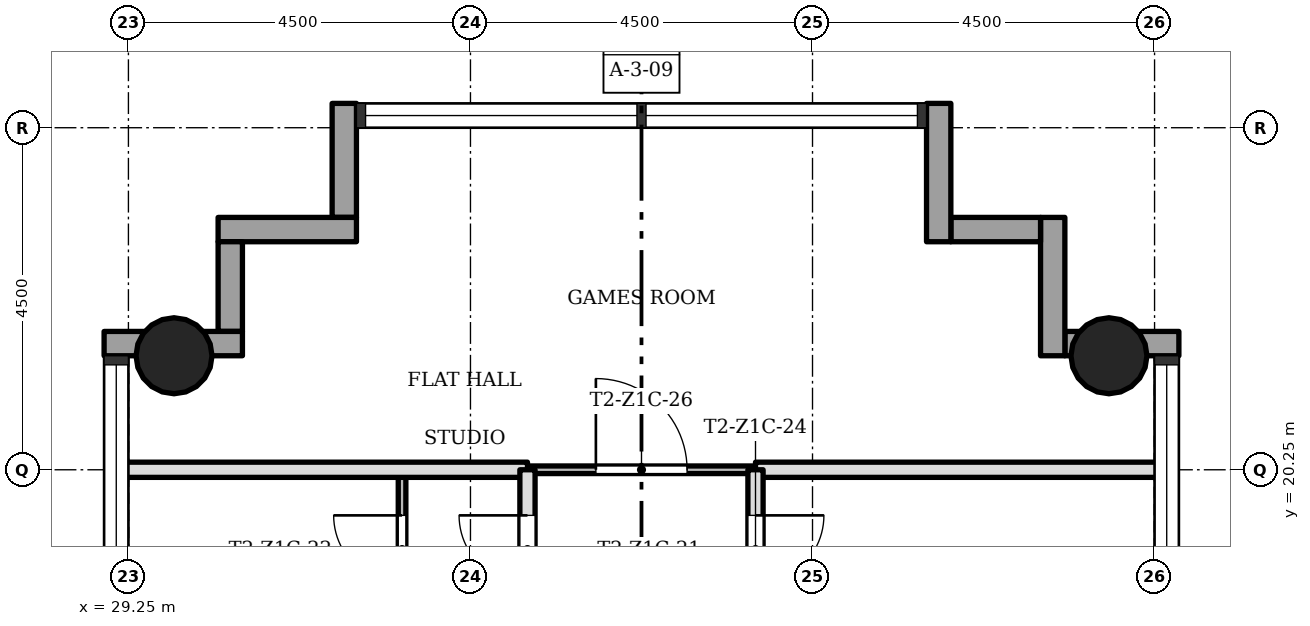
"""IFC4 building model, lengths in metres.
Left out: names, types, materials, properties, quantities, classifications, styles, units other than length and angle.
Written with IfcOpenShell. Run it as: python <this file> out.ifc"""

import sys

from ifc_helpers import new_model, si_unit, direction, frame, frame_2d, origin, origin_2d, place, context, subcontext, project, spatial, rectangle, hollow_circle, extrude, element, fill, save


model = new_model("IFC4")
c1 = context("Model", 3, precision=1e-05, world=origin(), true_north=direction((0.0, 1.0)))
c2 = subcontext(c1, "Body", "Model", "MODEL_VIEW")
j1 = project(units=[si_unit("LENGTHUNIT", "METRE"), si_unit("PLANEANGLEUNIT", "RADIAN")], contexts=[c1])
p1 = place(None, origin())
s1 = spatial("IfcSite", under=j1, at=p1, CompositionType="ELEMENT")
p2 = place(p1, origin())
s2 = spatial("IfcBuilding", under=s1, at=p2, CompositionType="ELEMENT")
p3 = place(p2, frame((0.0, 0.0, 48.3)))
s3 = spatial("IfcBuildingStorey", under=s2, at=p3, CompositionType="ELEMENT", Elevation=48.3)
for number, where, z_axis, x_axis in (
    (1, (42.15, 21.75, 0.0), (0.0, 0.0, 1.0), (1.0, 0.0, 0.0)),
    (2, (29.85, 21.75, 0.0), (0.0, 0.0, 1.0), (1.0, 0.0, 0.0)),
):
    element("IfcColumn", number, at=place(p3, frame(where, z_axis=z_axis, x_axis=x_axis)), inside=s3, PredefinedType="COLUMN", context=c2, shape_type="SweptSolid", body=[
        extrude(hollow_circle(Radius=0.5, WallThickness=0.036, at=origin_2d()), origin(), (0.0, 0.0, 1.0), 3.4),
    ])
p4 = place(p3, frame((43.07, 21.91, -0.3), z_axis=(0.0, 0.0, 1.0), x_axis=(-1.0, 0.0, 0.0)))
e3 = element("IfcWall", 3, at=p4, inside=s3, PredefinedType="STANDARD", context=c2, shape_type="SweptSolid", body=[
    extrude(rectangle(XDim=1.5, YDim=0.32, at=frame_2d((0.75, 0.0))), origin(), (0.0, 0.0, 1.0), 3.4),
])
p5 = place(p3, frame((41.41, 21.75, -0.3), z_axis=(0.0, 0.0, 1.0), x_axis=(0.0, 1.0, 0.0)))
e4 = element("IfcWall", 4, at=p5, inside=s3, PredefinedType="STANDARD", context=c2, shape_type="SweptSolid", body=[
    extrude(rectangle(XDim=1.82, YDim=0.32, at=frame_2d((0.91, 0.0))), origin(), (0.0, 0.0, 1.0), 3.4),
])
p6 = place(p3, frame((41.25, 23.41, -0.3), z_axis=(0.0, 0.0, 1.0), x_axis=(-1.0, 0.0, 0.0)))
e5 = element("IfcWall", 5, at=p6, inside=s3, PredefinedType="STANDARD", context=c2, shape_type="SweptSolid", body=[
    extrude(rectangle(XDim=1.18, YDim=0.32, at=frame_2d((0.59, 0.0))), origin(), (0.0, 0.0, 1.0), 3.4),
])
p7 = place(p3, frame((39.91, 23.25, -0.3), z_axis=(0.0, 0.0, 1.0), x_axis=(0.0, 1.0, 0.0)))
e6 = element("IfcWall", 6, at=p7, inside=s3, PredefinedType="STANDARD", context=c2, shape_type="SweptSolid", body=[
    extrude(rectangle(XDim=1.82, YDim=0.32, at=frame_2d((0.91, 0.0))), origin(), (0.0, 0.0, 1.0), 3.4),
])
p8 = place(p3, frame((32.09, 25.07, -0.3), z_axis=(0.0, 0.0, 1.0), x_axis=(0.0, -1.0, 0.0)))
e7 = element("IfcWall", 7, at=p8, inside=s3, PredefinedType="STANDARD", context=c2, shape_type="SweptSolid", body=[
    extrude(rectangle(XDim=1.5, YDim=0.32, at=frame_2d((0.75, 0.0))), origin(), (0.0, 0.0, 1.0), 3.4),
])
p9 = place(p3, frame((32.25, 23.41, -0.3), z_axis=(0.0, 0.0, 1.0), x_axis=(-1.0, 0.0, 0.0)))
e8 = element("IfcWall", 8, at=p9, inside=s3, PredefinedType="STANDARD", context=c2, shape_type="SweptSolid", body=[
    extrude(rectangle(XDim=1.82, YDim=0.32, at=frame_2d((0.91, 0.0))), origin(), (0.0, 0.0, 1.0), 3.4),
])
p10 = place(p3, frame((30.59, 23.25, -0.3), z_axis=(0.0, 0.0, 1.0), x_axis=(0.0, -1.0, 0.0)))
e9 = element("IfcWall", 9, at=p10, inside=s3, PredefinedType="STANDARD", context=c2, shape_type="SweptSolid", body=[
    extrude(rectangle(XDim=1.18, YDim=0.32, at=frame_2d((0.59, 0.0))), origin(), (0.0, 0.0, 1.0), 3.4),
])
p11 = place(p3, frame((30.75, 21.91, -0.3), z_axis=(0.0, 0.0, 1.0), x_axis=(-1.0, 0.0, 0.0)))
e10 = element("IfcWall", 10, at=p11, inside=s3, PredefinedType="STANDARD", context=c2, shape_type="SweptSolid", body=[
    extrude(rectangle(XDim=1.82, YDim=0.32, at=frame_2d((0.91, 0.0))), origin(), (0.0, 0.0, 1.0), 3.4),
])
p12 = place(p3, frame((37.5, 20.25, 0.0), z_axis=(0.0, 0.0, 1.0), x_axis=(-1.0, 0.0, 0.0)))
e11 = element("IfcWall", 11, at=p12, inside=s3, PredefinedType="PARTITIONING", context=c2, shape_type="SweptSolid", body=[
    extrude(rectangle(XDim=3.0, YDim=0.1, at=frame_2d((1.5, 0.0))), origin(), (0.0, 0.0, 1.0), 3.0),
])
p13 = place(p12, frame((0.9, 0.0, 0.0)))
e12 = element("IfcOpeningElement", 12, at=p13, cuts=e11, PredefinedType="OPENING", context=c2, shape_type="SweptSolid", body=[
    extrude(rectangle(XDim=1.2, YDim=2.1, at=frame_2d((0.6, 1.05))), frame((0.0, 0.06, 0.0), z_axis=(0.0, -1.0, 0.0), x_axis=(1.0, 0.0, 0.0)), (0.0, 0.0, 1.0), 0.12),
])
for number, where, z_axis, x_axis in (
    (13, (42.85, 20.25, 0.0), (0.0, 0.0, 1.0), (-1.0, 0.0, 0.0)),
    (14, (34.5, 20.25, 0.0), (0.0, 0.0, 1.0), (-1.0, 0.0, 0.0)),
):
    element("IfcWall", number, at=place(p3, frame(where, z_axis=z_axis, x_axis=x_axis)), inside=s3, PredefinedType="SOLIDWALL", context=c2, shape_type="SweptSolid", body=[
        extrude(rectangle(XDim=5.35, YDim=0.2, at=frame_2d((2.675, 0.0))), origin(), (0.0, 0.0, 1.0), 3.0),
    ])
p14 = place(p3, frame((37.5, 15.75, 0.0), z_axis=(0.0, 0.0, 1.0), x_axis=(0.0, 1.0, 0.0)))
e15 = element("IfcWall", 15, at=p14, inside=s3, PredefinedType="SOLIDWALL", context=c2, shape_type="SweptSolid", body=[
    extrude(rectangle(XDim=4.5, YDim=0.2, at=frame_2d((2.25, 0.0))), origin(), (0.0, 0.0, 1.0), 3.0),
])
p15 = place(p14, frame((3.0, 0.0, 0.0)))
e16 = element("IfcOpeningElement", 16, at=p15, cuts=e15, PredefinedType="OPENING", context=c2, shape_type="SweptSolid", body=[
    extrude(rectangle(XDim=0.9, YDim=2.1, at=frame_2d((0.45, 1.05))), frame((0.0, 0.11, 0.0), z_axis=(0.0, -1.0, 0.0), x_axis=(1.0, 0.0, 0.0)), (0.0, 0.0, 1.0), 0.22),
])
p16 = place(p3, frame((34.5, 15.75, 0.0), z_axis=(0.0, 0.0, 1.0), x_axis=(0.0, 1.0, 0.0)))
e17 = element("IfcWall", 17, at=p16, inside=s3, PredefinedType="SOLIDWALL", context=c2, shape_type="SweptSolid", body=[
    extrude(rectangle(XDim=4.5, YDim=0.2, at=frame_2d((2.25, 0.0))), origin(), (0.0, 0.0, 1.0), 3.0),
])
p17 = place(p16, frame((3.0, 0.0, 0.0)))
e18 = element("IfcOpeningElement", 18, at=p17, cuts=e17, PredefinedType="OPENING", context=c2, shape_type="SweptSolid", body=[
    extrude(rectangle(XDim=0.9, YDim=2.1, at=frame_2d((0.45, 1.05))), frame((0.0, 0.11, 0.0), z_axis=(0.0, -1.0, 0.0), x_axis=(1.0, 0.0, 0.0)), (0.0, 0.0, 1.0), 0.22),
])
p18 = place(p3, frame((32.85, 15.75, 0.0), z_axis=(0.0, 0.0, 1.0), x_axis=(0.0, 1.0, 0.0)))
e19 = element("IfcWall", 19, at=p18, inside=s3, PredefinedType="PARTITIONING", context=c2, shape_type="SweptSolid", body=[
    extrude(rectangle(XDim=4.5, YDim=0.1, at=frame_2d((2.25, 0.0))), origin(), (0.0, 0.0, 1.0), 3.0),
])
p19 = place(p18, frame((3.0, 0.0, 0.0)))
e20 = element("IfcOpeningElement", 20, at=p19, cuts=e19, PredefinedType="OPENING", context=c2, shape_type="SweptSolid", body=[
    extrude(rectangle(XDim=0.9, YDim=2.1, at=frame_2d((0.45, 1.05))), frame((0.0, 0.06, 0.0), z_axis=(0.0, -1.0, 0.0), x_axis=(1.0, 0.0, 0.0)), (0.0, 0.0, 1.0), 0.12),
])
p20 = place(p17, origin())
e21 = element("IfcDoor", 21, at=p20, inside=s3, OperationType="SINGLE_SWING_LEFT", PredefinedType="DOOR", context=c2, shape_type="SweptSolid", body=[
    extrude(rectangle(XDim=0.9, YDim=2.1, at=frame_2d((0.45, 1.05))), frame((0.0, 0.025, 0.0), z_axis=(0.0, -1.0, 0.0), x_axis=(1.0, 0.0, 0.0)), (0.0, 0.0, 1.0), 0.05),
])
fill(e18, e21)
p21 = place(p19, origin())
e22 = element("IfcDoor", 22, at=p21, inside=s3, OperationType="SINGLE_SWING_LEFT", PredefinedType="DOOR", context=c2, shape_type="SweptSolid", body=[
    extrude(rectangle(XDim=0.9, YDim=2.1, at=frame_2d((0.45, 1.05))), frame((0.0, 0.025, 0.0), z_axis=(0.0, -1.0, 0.0), x_axis=(1.0, 0.0, 0.0)), (0.0, 0.0, 1.0), 0.05),
])
fill(e20, e22)
p22 = place(p15, origin())
e23 = element("IfcDoor", 23, at=p22, inside=s3, OperationType="SINGLE_SWING_RIGHT", PredefinedType="DOOR", context=c2, shape_type="SweptSolid", body=[
    extrude(rectangle(XDim=0.9, YDim=2.1, at=frame_2d((0.45, 1.05))), frame((0.0, 0.025, 0.0), z_axis=(0.0, -1.0, 0.0), x_axis=(1.0, 0.0, 0.0)), (0.0, 0.0, 1.0), 0.05),
])
fill(e16, e23)
p23 = place(p13, origin())
e24 = element("IfcDoor", 24, at=p23, inside=s3, OperationType="SINGLE_SWING_RIGHT", PredefinedType="DOOR", context=c2, shape_type="SweptSolid", body=[
    extrude(rectangle(XDim=1.2, YDim=2.1, at=frame_2d((0.6, 1.05))), frame((0.0, 0.025, 0.0), z_axis=(0.0, -1.0, 0.0), x_axis=(1.0, 0.0, 0.0)), (0.0, 0.0, 1.0), 0.05),
])
fill(e12, e24)
save(model, sys.argv[1])
